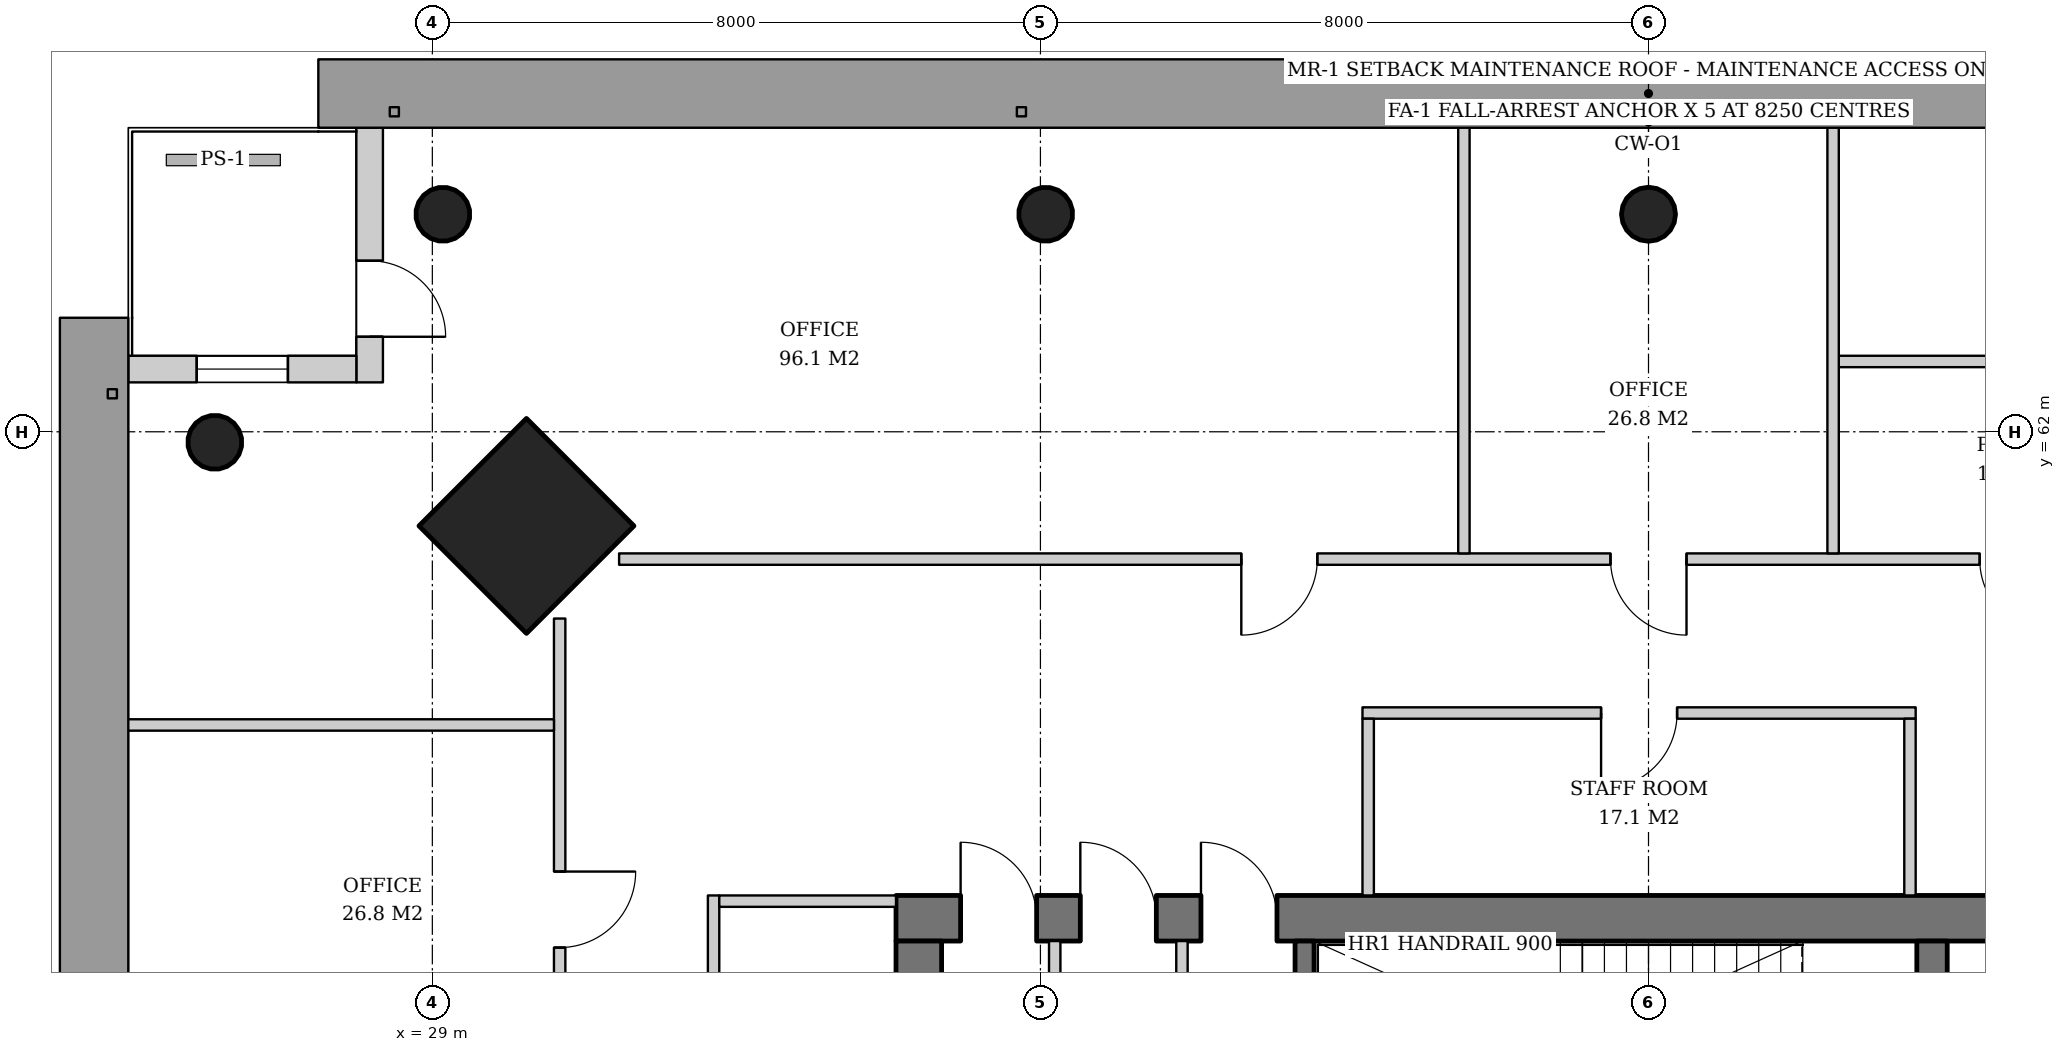
"""IFC4 building model, lengths in metres.
Left out: names, types, materials, properties, quantities, classifications, styles, units other than length and angle.
Written with IfcOpenShell. Run it as: python <this file> out.ifc"""

import sys

from ifc_helpers import new_model, si_unit, direction, frame, frame_2d, origin, origin_2d, place, context, subcontext, project, spatial, rectangle, hollow_circle, extrude, element, fill, save


model = new_model("IFC4")
c1 = context("Model", 3, precision=1e-05, world=origin(), true_north=direction((0.0, 1.0)))
c2 = subcontext(c1, "Body", "Model", "MODEL_VIEW")
j1 = project(units=[si_unit("LENGTHUNIT", "METRE"), si_unit("PLANEANGLEUNIT", "RADIAN")], contexts=[c1])
p1 = place(None, origin())
s1 = spatial("IfcSite", under=j1, at=p1, CompositionType="ELEMENT")
p2 = place(p1, origin())
s2 = spatial("IfcBuilding", under=s1, at=p2, CompositionType="ELEMENT")
p3 = place(p2, frame((0.0, 0.0, 180.6)))
s3 = spatial("IfcBuildingStorey", under=s2, at=p3, CompositionType="ELEMENT", Elevation=180.6)
p4 = place(p3, frame((30.2, 60.8, 0.0), z_axis=(0.031964207655, -0.031964207655, 0.998977766949), x_axis=(0.707106781187, 0.707106781187, 0.0)))
e1 = element("IfcColumn", 1, at=p4, inside=s3, PredefinedType="COLUMN", context=c2, shape_type="SweptSolid", body=[
    extrude(rectangle(XDim=2.0, YDim=2.0, at=origin_2d()), origin(), (0.0, 0.0, 1.0), 3.804),
])
p5 = place(p3, frame((29.1, 64.9, 0.0), z_axis=(0.031900153262, -0.031900153262, 0.998981861919), x_axis=(0.707106781187, 0.707106781187, 0.0)))
e2 = element("IfcColumn", 2, at=p5, inside=s3, PredefinedType="COLUMN", context=c2, shape_type="SweptSolid", body=[
    extrude(hollow_circle(Radius=0.355, WallThickness=0.025, at=origin_2d()), origin(), (0.0, 0.0, 1.0), 3.804),
])
p6 = place(p3, frame((45.0, 64.9, 0.0), z_axis=(0.0, -0.031916396774, 0.999490542035), x_axis=(1.0, 0.0, 0.0)))
e3 = element("IfcColumn", 3, at=p6, inside=s3, PredefinedType="COLUMN", context=c2, shape_type="SweptSolid", body=[
    extrude(hollow_circle(Radius=0.355, WallThickness=0.025, at=origin_2d()), origin(), (0.0, 0.0, 1.0), 3.802),
])
p7 = place(p3, frame((37.05, 64.9, 0.0), z_axis=(0.015924069971, -0.031912349901, 0.999363810591), x_axis=(0.894786976326, 0.446493300058, 0.0)))
e4 = element("IfcColumn", 4, at=p7, inside=s3, PredefinedType="COLUMN", context=c2, shape_type="SweptSolid", body=[
    extrude(hollow_circle(Radius=0.355, WallThickness=0.025, at=origin_2d()), origin(), (0.0, 0.0, 1.0), 3.802),
])
p8 = place(p3, frame((26.1, 61.9, 0.0), z_axis=(0.031900153262, -0.031900153262, 0.998981861919), x_axis=(0.707106781187, 0.707106781187, 0.0)))
e5 = element("IfcColumn", 5, at=p8, inside=s3, PredefinedType="COLUMN", context=c2, shape_type="SweptSolid", body=[
    extrude(hollow_circle(Radius=0.355, WallThickness=0.025, at=origin_2d()), origin(), (0.0, 0.0, 1.0), 3.804),
])
p9 = place(p3, frame((35.1, 55.6, 0.0), z_axis=(0.0, 0.0, 1.0), x_axis=(1.0, 0.0, 0.0)))
e6 = element("IfcWall", 6, at=p9, inside=s3, PredefinedType="SHEAR", context=c2, shape_type="SweptSolid", body=[
    extrude(rectangle(XDim=19.8, YDim=0.6, at=frame_2d((9.9, 0.0))), origin(), (0.0, 0.0, 1.0), 3.8),
])
p10 = place(p9, frame((14.54, 0.0, 0.0)))
e7 = element("IfcOpeningElement", 7, at=p10, cuts=e6, PredefinedType="OPENING", context=c2, shape_type="SweptSolid", body=[
    extrude(rectangle(XDim=1.0, YDim=2.1, at=frame_2d((0.5, 1.05))), frame((0.0, 0.31, 0.0), z_axis=(0.0, -1.0, 0.0), x_axis=(1.0, 0.0, 0.0)), (0.0, 0.0, 1.0), 0.62),
])
p11 = place(p9, frame((0.85, 0.0, 0.0)))
e8 = element("IfcOpeningElement", 8, at=p11, cuts=e6, PredefinedType="OPENING", context=c2, shape_type="SweptSolid", body=[
    extrude(rectangle(XDim=1.0, YDim=2.1, at=frame_2d((0.5, 1.05))), frame((0.0, 0.31, 0.0), z_axis=(0.0, -1.0, 0.0), x_axis=(1.0, 0.0, 0.0)), (0.0, 0.0, 1.0), 0.62),
])
p12 = place(p9, frame((2.425, 0.0, 0.0)))
e9 = element("IfcOpeningElement", 9, at=p12, cuts=e6, PredefinedType="OPENING", context=c2, shape_type="SweptSolid", body=[
    extrude(rectangle(XDim=1.0, YDim=2.1, at=frame_2d((0.5, 1.05))), frame((0.0, 0.31, 0.0), z_axis=(0.0, -1.0, 0.0), x_axis=(1.0, 0.0, 0.0)), (0.0, 0.0, 1.0), 0.62),
])
p13 = place(p9, frame((4.012, 0.0, 0.0)))
e10 = element("IfcOpeningElement", 10, at=p13, cuts=e6, PredefinedType="OPENING", context=c2, shape_type="SweptSolid", body=[
    extrude(rectangle(XDim=1.0, YDim=2.1, at=frame_2d((0.5, 1.05))), frame((0.0, 0.31, 0.0), z_axis=(0.0, -1.0, 0.0), x_axis=(1.0, 0.0, 0.0)), (0.0, 0.0, 1.0), 0.62),
])
p14 = place(p3, frame((35.4, 36.7, 0.0), z_axis=(0.0, 0.0, 1.0), x_axis=(0.0, 1.0, 0.0)))
e11 = element("IfcWall", 11, at=p14, inside=s3, PredefinedType="SHEAR", context=c2, shape_type="SweptSolid", body=[
    extrude(rectangle(XDim=18.6, YDim=0.6, at=frame_2d((9.3, 0.0))), origin(), (0.0, 0.0, 1.0), 3.8),
])
p15 = place(p14, frame((8.4, 0.0, 0.0)))
e12 = element("IfcOpeningElement", 12, at=p15, cuts=e11, PredefinedType="OPENING", context=c2, shape_type="SweptSolid", body=[
    extrude(rectangle(XDim=1.8, YDim=2.4, at=frame_2d((0.9, 1.2))), frame((0.0, 0.31, 0.0), z_axis=(0.0, -1.0, 0.0), x_axis=(1.0, 0.0, 0.0)), (0.0, 0.0, 1.0), 0.62),
])
p16 = place(p3, frame((48.73, 52.4, 0.0), z_axis=(0.0, 0.0, 1.0), x_axis=(0.0, 1.0, 0.0)))
e13 = element("IfcWall", 13, at=p16, inside=s3, PredefinedType="SHEAR", context=c2, shape_type="SweptSolid", body=[
    extrude(rectangle(XDim=2.9, YDim=0.4, at=frame_2d((1.45, 0.0))), origin(), (0.0, 0.0, 1.0), 3.8),
])
p17 = place(p16, frame((0.3, 0.0, 0.0)))
e14 = element("IfcOpeningElement", 14, at=p17, cuts=e13, PredefinedType="OPENING", context=c2, shape_type="SweptSolid", body=[
    extrude(rectangle(XDim=1.0, YDim=2.1, at=frame_2d((0.5, 1.05))), frame((0.0, 0.21, 0.0), z_axis=(0.0, -1.0, 0.0), x_axis=(1.0, 0.0, 0.0)), (0.0, 0.0, 1.0), 0.42),
])
p18 = place(p3, frame((28.175, 66.0, 0.0), z_axis=(0.0, 0.0, 1.0), x_axis=(0.0, -1.0, 0.0)))
e15 = element("IfcWall", 15, at=p18, inside=s3, PredefinedType="SOLIDWALL", context=c2, shape_type="SweptSolid", body=[
    extrude(rectangle(XDim=3.35, YDim=0.35, at=frame_2d((1.675, 0.0))), origin(), (0.0, 0.0, 1.0), 3.62),
])
p19 = place(p18, frame((1.75, 0.0, 0.0)))
e16 = element("IfcOpeningElement", 16, at=p19, cuts=e15, PredefinedType="OPENING", context=c2, shape_type="SweptSolid", body=[
    extrude(rectangle(XDim=1.0, YDim=2.4, at=frame_2d((0.5, 1.2))), frame((0.0, 0.185, 0.0), z_axis=(0.0, -1.0, 0.0), x_axis=(1.0, 0.0, 0.0)), (0.0, 0.0, 1.0), 0.37),
])
p20 = place(p3, frame((28.0, 62.825, 0.0), z_axis=(0.0, 0.0, 1.0), x_axis=(-1.0, 0.0, 0.0)))
e17 = element("IfcWall", 17, at=p20, inside=s3, PredefinedType="SOLIDWALL", context=c2, shape_type="SweptSolid", body=[
    extrude(rectangle(XDim=3.0, YDim=0.35, at=frame_2d((1.5, 0.0))), origin(), (0.0, 0.0, 1.0), 3.62),
])
p21 = place(p20, frame((0.9, 0.0, 0.6)))
e18 = element("IfcOpeningElement", 18, at=p21, cuts=e17, PredefinedType="OPENING", context=c2, shape_type="SweptSolid", body=[
    extrude(rectangle(XDim=1.2, YDim=2.55, at=frame_2d((0.6, 1.275))), frame((0.0, 0.185, 0.0), z_axis=(0.0, -1.0, 0.0), x_axis=(1.0, 0.0, 0.0)), (0.0, 0.0, 1.0), 0.37),
])
p22 = place(p3, frame((40.475, 52.4, 0.0), z_axis=(0.0, 0.0, 1.0), x_axis=(0.0, 1.0, 0.0)))
e19 = element("IfcWall", 19, at=p22, inside=s3, PredefinedType="SHEAR", context=c2, shape_type="SweptSolid", body=[
    extrude(rectangle(XDim=2.9, YDim=0.25, at=frame_2d((1.45, 0.0))), origin(), (0.0, 0.0, 1.0), 3.8),
])
for number, where, z_axis, x_axis in (
    (20, (37.188, 52.4, 0.0), (0.0, 0.0, 1.0), (0.0, 1.0, 0.0)),
    (21, (38.862, 52.4, 0.0), (0.0, 0.0, 1.0), (0.0, 1.0, 0.0)),
):
    element("IfcWall", number, at=place(p3, frame(where, z_axis=z_axis, x_axis=x_axis)), inside=s3, PredefinedType="SOLIDWALL", context=c2, shape_type="SweptSolid", body=[
        extrude(rectangle(XDim=2.9, YDim=0.15, at=frame_2d((1.45, 0.0))), origin(), (0.0, 0.0, 1.0), 3.62),
    ])
p23 = place(p3, frame((48.515, 58.3, 0.0), z_axis=(0.0, 0.0, 1.0), x_axis=(-1.0, 0.0, 0.0)))
e22 = element("IfcWall", 22, at=p23, inside=s3, PredefinedType="PARTITIONING", context=c2, shape_type="SweptSolid", body=[
    extrude(rectangle(XDim=7.278, YDim=0.15, at=frame_2d((3.639, 0.0))), origin(), (0.0, 0.0, 1.0), 2.867),
])
p24 = place(p23, frame((3.139, 0.0, 0.0)))
e23 = element("IfcOpeningElement", 23, at=p24, cuts=e22, PredefinedType="OPENING", context=c2, shape_type="SweptSolid", body=[
    extrude(rectangle(XDim=1.0, YDim=2.1, at=frame_2d((0.5, 1.05))), frame((0.0, 0.085, 0.0), z_axis=(0.0, -1.0, 0.0), x_axis=(1.0, 0.0, 0.0)), (0.0, 0.0, 1.0), 0.17),
])
for number, where, z_axis, x_axis in (
    (24, (48.44, 55.9, 0.0), (0.0, 0.0, 1.0), (0.0, 1.0, 0.0)),
    (25, (41.312, 55.9, 0.0), (0.0, 0.0, 1.0), (0.0, 1.0, 0.0)),
):
    element("IfcWall", number, at=place(p3, frame(where, z_axis=z_axis, x_axis=x_axis)), inside=s3, PredefinedType="PARTITIONING", context=c2, shape_type="SweptSolid", body=[
        extrude(rectangle(XDim=2.325, YDim=0.15, at=frame_2d((1.163, 0.0))), origin(), (0.0, 0.0, 1.0), 3.62),
    ])
p25 = place(p3, frame((32.7, 55.9, 0.0), z_axis=(0.0, 0.0, 1.0), x_axis=(0.0, -1.0, 0.0)))
e26 = element("IfcWall", 26, at=p25, inside=s3, PredefinedType="PARTITIONING", context=c2, shape_type="SweptSolid", body=[
    extrude(rectangle(XDim=7.875, YDim=0.15, at=frame_2d((3.938, 0.0))), origin(), (0.0, 0.0, 1.0), 2.867),
])
p26 = place(p25, frame((3.438, 0.0, 0.0)))
e27 = element("IfcOpeningElement", 27, at=p26, cuts=e26, PredefinedType="OPENING", context=c2, shape_type="SweptSolid", body=[
    extrude(rectangle(XDim=1.0, YDim=2.1, at=frame_2d((0.5, 1.05))), frame((0.0, 0.085, 0.0), z_axis=(0.0, -1.0, 0.0), x_axis=(1.0, 0.0, 0.0)), (0.0, 0.0, 1.0), 0.17),
])
p27 = place(p3, frame((35.1, 55.825, 0.0), z_axis=(0.0, 0.0, 1.0), x_axis=(-1.0, 0.0, 0.0)))
e28 = element("IfcWall", 28, at=p27, inside=s3, PredefinedType="PARTITIONING", context=c2, shape_type="SweptSolid", body=[
    extrude(rectangle(XDim=2.325, YDim=0.15, at=frame_2d((1.163, 0.0))), origin(), (0.0, 0.0, 1.0), 2.867),
])
p28 = place(p3, frame((52.211, 62.925, 0.0), z_axis=(0.0, 0.0, 1.0), x_axis=(-1.0, 0.0, 0.0)))
e29 = element("IfcWall", 29, at=p28, inside=s3, PredefinedType="PARTITIONING", context=c2, shape_type="SweptSolid", body=[
    extrude(rectangle(XDim=4.707, YDim=0.15, at=frame_2d((2.354, 0.0))), origin(), (0.0, 0.0, 1.0), 2.867),
])
p29 = place(p3, frame((58.543, 60.325, 0.0), z_axis=(0.0, 0.0, 1.0), x_axis=(-1.0, 0.0, 0.0)))
e30 = element("IfcWall", 30, at=p29, inside=s3, PredefinedType="PARTITIONING", context=c2, shape_type="SweptSolid", body=[
    extrude(rectangle(XDim=27.086, YDim=0.15, at=frame_2d((13.543, 0.0))), origin(), (0.0, 0.0, 1.0), 2.867),
])
p30 = place(p29, frame((3.329, 0.0, 0.0)))
e31 = element("IfcOpeningElement", 31, at=p30, cuts=e30, PredefinedType="OPENING", context=c2, shape_type="SweptSolid", body=[
    extrude(rectangle(XDim=1.0, YDim=2.1, at=frame_2d((0.5, 1.05))), frame((0.0, 0.085, 0.0), z_axis=(0.0, -1.0, 0.0), x_axis=(1.0, 0.0, 0.0)), (0.0, 0.0, 1.0), 0.17),
])
p31 = place(p29, frame((8.186, 0.0, 0.0)))
e32 = element("IfcOpeningElement", 32, at=p31, cuts=e30, PredefinedType="OPENING", context=c2, shape_type="SweptSolid", body=[
    extrude(rectangle(XDim=1.0, YDim=2.1, at=frame_2d((0.5, 1.05))), frame((0.0, 0.085, 0.0), z_axis=(0.0, -1.0, 0.0), x_axis=(1.0, 0.0, 0.0)), (0.0, 0.0, 1.0), 0.17),
])
p32 = place(p29, frame((13.043, 0.0, 0.0)))
e33 = element("IfcOpeningElement", 33, at=p32, cuts=e30, PredefinedType="OPENING", context=c2, shape_type="SweptSolid", body=[
    extrude(rectangle(XDim=1.0, YDim=2.1, at=frame_2d((0.5, 1.05))), frame((0.0, 0.085, 0.0), z_axis=(0.0, -1.0, 0.0), x_axis=(1.0, 0.0, 0.0)), (0.0, 0.0, 1.0), 0.17),
])
p33 = place(p29, frame((17.9, 0.0, 0.0)))
e34 = element("IfcOpeningElement", 34, at=p33, cuts=e30, PredefinedType="OPENING", context=c2, shape_type="SweptSolid", body=[
    extrude(rectangle(XDim=1.0, YDim=2.1, at=frame_2d((0.5, 1.05))), frame((0.0, 0.085, 0.0), z_axis=(0.0, -1.0, 0.0), x_axis=(1.0, 0.0, 0.0)), (0.0, 0.0, 1.0), 0.17),
])
p34 = place(p3, frame((47.428, 60.4, 0.0), z_axis=(0.0, 0.0, 1.0), x_axis=(0.0, 1.0, 0.0)))
e35 = element("IfcWall", 35, at=p34, inside=s3, PredefinedType="PARTITIONING", context=c2, shape_type="SweptSolid", body=[
    extrude(rectangle(XDim=5.64, YDim=0.15, at=frame_2d((2.82, 0.0))), origin(), (0.0, 0.0, 1.0), 3.12),
])
p35 = place(p3, frame((42.572, 60.4, 0.0), z_axis=(0.0, 0.0, 1.0), x_axis=(0.0, 1.0, 0.0)))
e36 = element("IfcWall", 36, at=p35, inside=s3, PredefinedType="PARTITIONING", context=c2, shape_type="SweptSolid", body=[
    extrude(rectangle(XDim=5.64, YDim=0.15, at=frame_2d((2.82, 0.0))), origin(), (0.0, 0.0, 1.0), 2.867),
])
p36 = place(p3, frame((30.675, 59.543, 0.0), z_axis=(0.0, 0.0, 1.0), x_axis=(0.0, -1.0, 0.0)))
e37 = element("IfcWall", 37, at=p36, inside=s3, PredefinedType="PARTITIONING", context=c2, shape_type="SweptSolid", body=[
    extrude(rectangle(XDim=27.086, YDim=0.15, at=frame_2d((13.543, 0.0))), origin(), (0.0, 0.0, 1.0), 2.867),
])
p37 = place(p36, frame((3.329, 0.0, 0.0)))
e38 = element("IfcOpeningElement", 38, at=p37, cuts=e37, PredefinedType="OPENING", context=c2, shape_type="SweptSolid", body=[
    extrude(rectangle(XDim=1.0, YDim=2.1, at=frame_2d((0.5, 1.05))), frame((0.0, 0.085, 0.0), z_axis=(0.0, -1.0, 0.0), x_axis=(1.0, 0.0, 0.0)), (0.0, 0.0, 1.0), 0.17),
])
p38 = place(p36, frame((8.186, 0.0, 0.0)))
e39 = element("IfcOpeningElement", 39, at=p38, cuts=e37, PredefinedType="OPENING", context=c2, shape_type="SweptSolid", body=[
    extrude(rectangle(XDim=1.0, YDim=2.1, at=frame_2d((0.5, 1.05))), frame((0.0, 0.085, 0.0), z_axis=(0.0, -1.0, 0.0), x_axis=(1.0, 0.0, 0.0)), (0.0, 0.0, 1.0), 0.17),
])
p39 = place(p36, frame((13.143, 0.0, 0.0)))
e40 = element("IfcOpeningElement", 40, at=p39, cuts=e37, PredefinedType="OPENING", context=c2, shape_type="SweptSolid", body=[
    extrude(rectangle(XDim=0.8, YDim=2.1, at=frame_2d((0.4, 1.05))), frame((0.0, 0.085, 0.0), z_axis=(0.0, -1.0, 0.0), x_axis=(1.0, 0.0, 0.0)), (0.0, 0.0, 1.0), 0.17),
])
p40 = place(p36, frame((17.9, 0.0, 0.0)))
e41 = element("IfcOpeningElement", 41, at=p40, cuts=e37, PredefinedType="OPENING", context=c2, shape_type="SweptSolid", body=[
    extrude(rectangle(XDim=1.0, YDim=2.1, at=frame_2d((0.5, 1.05))), frame((0.0, 0.085, 0.0), z_axis=(0.0, -1.0, 0.0), x_axis=(1.0, 0.0, 0.0)), (0.0, 0.0, 1.0), 0.17),
])
p41 = place(p36, frame((22.857, 0.0, 0.0)))
e42 = element("IfcOpeningElement", 42, at=p41, cuts=e37, PredefinedType="OPENING", context=c2, shape_type="SweptSolid", body=[
    extrude(rectangle(XDim=0.8, YDim=2.1, at=frame_2d((0.4, 1.05))), frame((0.0, 0.085, 0.0), z_axis=(0.0, -1.0, 0.0), x_axis=(1.0, 0.0, 0.0)), (0.0, 0.0, 1.0), 0.17),
])
p42 = place(p3, frame((30.6, 58.143, 0.0), z_axis=(0.0, 0.0, 1.0), x_axis=(-1.0, 0.0, 0.0)))
e43 = element("IfcWall", 43, at=p42, inside=s3, PredefinedType="PARTITIONING", context=c2, shape_type="SweptSolid", body=[
    extrude(rectangle(XDim=5.64, YDim=0.15, at=frame_2d((2.82, 0.0))), origin(), (0.0, 0.0, 1.0), 3.12),
])
p43 = place(p19, origin())
e44 = element("IfcDoor", 44, at=p43, inside=s3, OperationType="SINGLE_SWING_RIGHT", PredefinedType="DOOR", context=c2, shape_type="SweptSolid", body=[
    extrude(rectangle(XDim=1.0, YDim=2.4, at=frame_2d((0.5, 1.2))), frame((0.0, 0.025, 0.0), z_axis=(0.0, -1.0, 0.0), x_axis=(1.0, 0.0, 0.0)), (0.0, 0.0, 1.0), 0.05),
])
fill(e16, e44)
p44 = place(p21, origin())
e45 = element("IfcWindow", 45, at=p44, inside=s3, PartitioningType="SINGLE_PANEL", PredefinedType="WINDOW", context=c2, shape_type="SweptSolid", body=[
    extrude(rectangle(XDim=1.2, YDim=2.55, at=frame_2d((0.6, 1.275))), frame((0.0, 0.03, 0.0), z_axis=(0.0, -1.0, 0.0), x_axis=(1.0, 0.0, 0.0)), (0.0, 0.0, 1.0), 0.06),
])
fill(e18, e45)
p45 = place(p11, origin())
e46 = element("IfcDoor", 46, at=p45, inside=s3, OperationType="SINGLE_SWING_LEFT", PredefinedType="DOOR", context=c2, shape_type="SweptSolid", body=[
    extrude(rectangle(XDim=1.0, YDim=2.1, at=frame_2d((0.5, 1.05))), frame((0.0, -0.24, 0.0), z_axis=(0.0, -1.0, 0.0), x_axis=(1.0, 0.0, 0.0)), (0.0, 0.0, 1.0), 0.05),
])
fill(e8, e46)
p46 = place(p12, origin())
e47 = element("IfcDoor", 47, at=p46, inside=s3, OperationType="SINGLE_SWING_LEFT", PredefinedType="DOOR", context=c2, shape_type="SweptSolid", body=[
    extrude(rectangle(XDim=1.0, YDim=2.1, at=frame_2d((0.5, 1.05))), frame((0.0, -0.24, 0.0), z_axis=(0.0, -1.0, 0.0), x_axis=(1.0, 0.0, 0.0)), (0.0, 0.0, 1.0), 0.05),
])
fill(e9, e47)
p47 = place(p13, origin())
e48 = element("IfcDoor", 48, at=p47, inside=s3, OperationType="SINGLE_SWING_LEFT", PredefinedType="DOOR", context=c2, shape_type="SweptSolid", body=[
    extrude(rectangle(XDim=1.0, YDim=2.1, at=frame_2d((0.5, 1.05))), frame((0.0, -0.24, 0.0), z_axis=(0.0, -1.0, 0.0), x_axis=(1.0, 0.0, 0.0)), (0.0, 0.0, 1.0), 0.05),
])
fill(e10, e48)
p48 = place(p24, origin())
e49 = element("IfcDoor", 49, at=p48, inside=s3, OperationType="SINGLE_SWING_RIGHT", PredefinedType="DOOR", context=c2, shape_type="SweptSolid", body=[
    extrude(rectangle(XDim=1.0, YDim=2.1, at=frame_2d((0.5, 1.05))), frame((0.0, 0.025, 0.0), z_axis=(0.0, -1.0, 0.0), x_axis=(1.0, 0.0, 0.0)), (0.0, 0.0, 1.0), 0.05),
])
fill(e23, e49)
p49 = place(p31, origin())
e50 = element("IfcDoor", 50, at=p49, inside=s3, OperationType="SINGLE_SWING_LEFT", PredefinedType="DOOR", context=c2, shape_type="SweptSolid", body=[
    extrude(rectangle(XDim=1.0, YDim=2.1, at=frame_2d((0.5, 1.05))), frame((0.0, 0.025, 0.0), z_axis=(0.0, -1.0, 0.0), x_axis=(1.0, 0.0, 0.0)), (0.0, 0.0, 1.0), 0.05),
])
fill(e32, e50)
p50 = place(p32, origin())
e51 = element("IfcDoor", 51, at=p50, inside=s3, OperationType="SINGLE_SWING_LEFT", PredefinedType="DOOR", context=c2, shape_type="SweptSolid", body=[
    extrude(rectangle(XDim=1.0, YDim=2.1, at=frame_2d((0.5, 1.05))), frame((0.0, 0.025, 0.0), z_axis=(0.0, -1.0, 0.0), x_axis=(1.0, 0.0, 0.0)), (0.0, 0.0, 1.0), 0.05),
])
fill(e33, e51)
p51 = place(p33, origin())
e52 = element("IfcDoor", 52, at=p51, inside=s3, OperationType="SINGLE_SWING_RIGHT", PredefinedType="DOOR", context=c2, shape_type="SweptSolid", body=[
    extrude(rectangle(XDim=1.0, YDim=2.1, at=frame_2d((0.5, 1.05))), frame((0.0, 0.025, 0.0), z_axis=(0.0, -1.0, 0.0), x_axis=(1.0, 0.0, 0.0)), (0.0, 0.0, 1.0), 0.05),
])
fill(e34, e52)
p52 = place(p37, origin())
e53 = element("IfcDoor", 53, at=p52, inside=s3, OperationType="SINGLE_SWING_LEFT", PredefinedType="DOOR", context=c2, shape_type="SweptSolid", body=[
    extrude(rectangle(XDim=1.0, YDim=2.1, at=frame_2d((0.5, 1.05))), frame((0.0, 0.025, 0.0), z_axis=(0.0, -1.0, 0.0), x_axis=(1.0, 0.0, 0.0)), (0.0, 0.0, 1.0), 0.05),
])
fill(e38, e53)
save(model, sys.argv[1])
